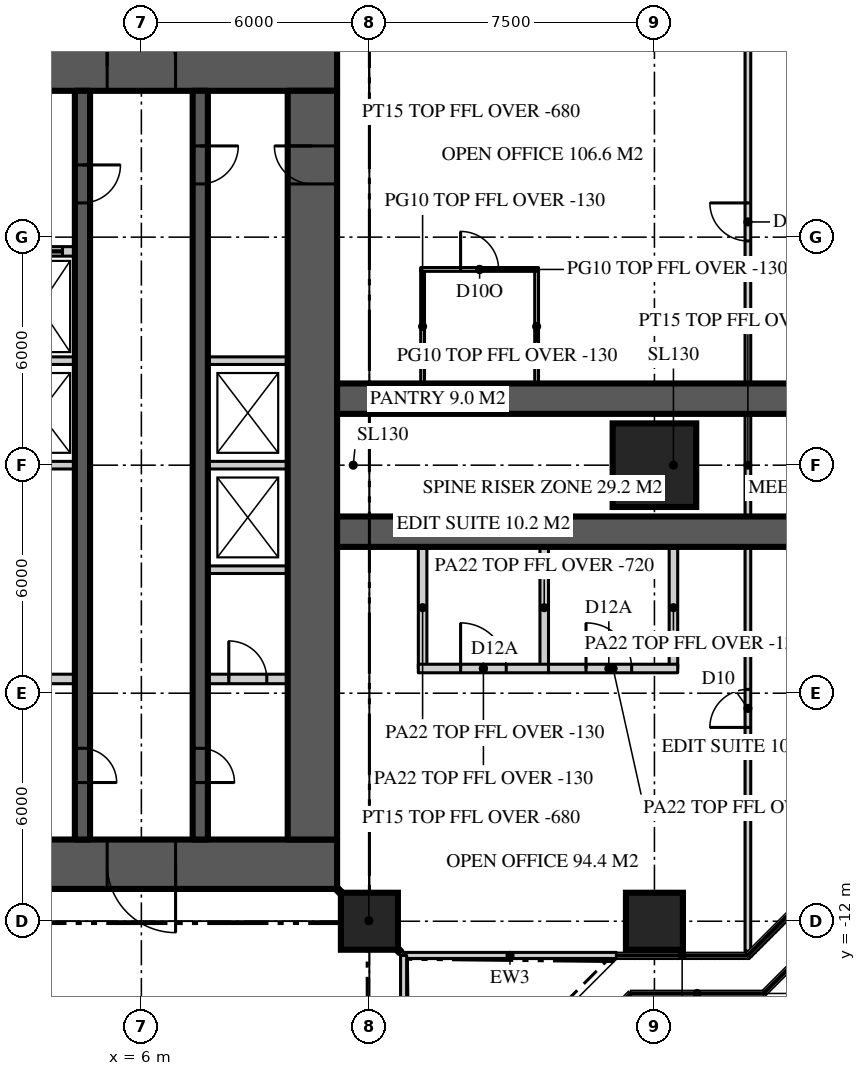
"""IFC4 building model, lengths in metres.
Left out: names, types, materials, properties, quantities, classifications, styles, units other than length and angle.
Written with IfcOpenShell. Run it as: python <this file> out.ifc"""

import sys

from ifc_helpers import new_model, si_unit, direction, frame, frame_2d, origin, origin_2d, place, context, subcontext, project, spatial, rectangle, extrude, element, fill, save


model = new_model("IFC4")
c1 = context("Model", 3, precision=1e-05, world=origin(), true_north=direction((0.0, 1.0)))
c2 = subcontext(c1, "Body", "Model", "MODEL_VIEW")
j1 = project(units=[si_unit("LENGTHUNIT", "METRE"), si_unit("PLANEANGLEUNIT", "RADIAN")], contexts=[c1])
p1 = place(None, origin())
s1 = spatial("IfcSite", under=j1, at=p1, CompositionType="ELEMENT")
p2 = place(p1, origin())
s2 = spatial("IfcBuilding", under=s1, at=p2, CompositionType="ELEMENT")
p3 = place(p2, frame((0.0, 0.0, 236.1)))
s3 = spatial("IfcBuildingStorey", under=s2, at=p3, CompositionType="ELEMENT", Elevation=236.1)
p4 = place(p3, frame((-11.15, 10.5, 0.0), z_axis=(0.0, 0.0, 1.0), x_axis=(1.0, 0.0, 0.0)))
e1 = element("IfcWall", 1, at=p4, inside=s3, PredefinedType="SHEAR", context=c2, shape_type="SweptSolid", body=[
    extrude(rectangle(XDim=22.3, YDim=1.3, at=frame_2d((11.15, 0.0))), origin(), (0.0, 0.0, 1.0), 3.9),
])
p5 = place(p4, frame((4.25, 0.0, 0.0)))
e2 = element("IfcOpeningElement", 2, at=p5, cuts=e1, PredefinedType="OPENING", context=c2, shape_type="SweptSolid", body=[
    extrude(rectangle(XDim=1.8, YDim=2.2, at=frame_2d((0.9, 1.1))), frame((0.0, 0.66, 0.0), z_axis=(0.0, -1.0, 0.0), x_axis=(1.0, 0.0, 0.0)), (0.0, 0.0, 1.0), 1.32),
])
p6 = place(p4, frame((16.25, 0.0, 0.0)))
e3 = element("IfcOpeningElement", 3, at=p6, cuts=e1, PredefinedType="OPENING", context=c2, shape_type="SweptSolid", body=[
    extrude(rectangle(XDim=1.8, YDim=2.2, at=frame_2d((0.9, 1.1))), frame((0.0, 0.66, 0.0), z_axis=(0.0, -1.0, 0.0), x_axis=(1.0, 0.0, 0.0)), (0.0, 0.0, 1.0), 1.32),
])
p7 = place(p3, frame((11.15, -10.5, 0.0), z_axis=(0.0, 0.0, 1.0), x_axis=(-1.0, 0.0, 0.0)))
e4 = element("IfcWall", 4, at=p7, inside=s3, PredefinedType="SHEAR", context=c2, shape_type="SweptSolid", body=[
    extrude(rectangle(XDim=22.3, YDim=1.3, at=frame_2d((11.15, 0.0))), origin(), (0.0, 0.0, 1.0), 3.9),
])
p8 = place(p7, frame((16.25, 0.0, 0.0)))
e5 = element("IfcOpeningElement", 5, at=p8, cuts=e4, PredefinedType="OPENING", context=c2, shape_type="SweptSolid", body=[
    extrude(rectangle(XDim=1.8, YDim=2.2, at=frame_2d((0.9, 1.1))), frame((0.0, 0.66, 0.0), z_axis=(0.0, -1.0, 0.0), x_axis=(1.0, 0.0, 0.0)), (0.0, 0.0, 1.0), 1.32),
])
p9 = place(p7, frame((4.25, 0.0, 0.0)))
e6 = element("IfcOpeningElement", 6, at=p9, cuts=e4, PredefinedType="OPENING", context=c2, shape_type="SweptSolid", body=[
    extrude(rectangle(XDim=1.8, YDim=2.2, at=frame_2d((0.9, 1.1))), frame((0.0, 0.66, 0.0), z_axis=(0.0, -1.0, 0.0), x_axis=(1.0, 0.0, 0.0)), (0.0, 0.0, 1.0), 1.32),
])
p10 = place(p3, frame((10.5, -9.85, 0.0), z_axis=(0.0, 0.0, 1.0), x_axis=(0.0, 1.0, 0.0)))
e7 = element("IfcWall", 7, at=p10, inside=s3, PredefinedType="SHEAR", context=c2, shape_type="SweptSolid", body=[
    extrude(rectangle(XDim=19.7, YDim=1.3, at=frame_2d((9.85, 0.0))), origin(), (0.0, 0.0, 1.0), 3.9),
])
p11 = place(p10, frame((17.25, 0.0, 0.0)))
e8 = element("IfcOpeningElement", 8, at=p11, cuts=e7, PredefinedType="OPENING", context=c2, shape_type="SweptSolid", body=[
    extrude(rectangle(XDim=1.0, YDim=2.2, at=frame_2d((0.5, 1.1))), frame((0.0, 0.66, 0.0), z_axis=(0.0, -1.0, 0.0), x_axis=(1.0, 0.0, 0.0)), (0.0, 0.0, 1.0), 1.32),
])
for number, where, z_axis, x_axis in (
    (9, (11.15, -1.75, 0.0), (0.0, 0.0, 1.0), (1.0, 0.0, 0.0)),
    (10, (11.15, 1.75, 0.0), (0.0, 0.0, 1.0), (1.0, 0.0, 0.0)),
):
    element("IfcWall", number, at=place(p3, frame(where, z_axis=z_axis, x_axis=x_axis)), inside=s3, PredefinedType="SHEAR", context=c2, shape_type="SweptSolid", body=[
        extrude(rectangle(XDim=15.25, YDim=0.8, at=frame_2d((7.625, 0.0))), origin(), (0.0, 0.0, 1.0), 3.9),
    ])
for number, where, z_axis, x_axis in (
    (11, (12.0, -12.0, 0.0), (0.0, 0.0, 1.0), (1.0, 0.0, 0.0)),
    (12, (19.5, -12.0, 0.0), (0.0, 0.0, 1.0), (1.0, 0.0, 0.0)),
):
    element("IfcColumn", number, at=place(p3, frame(where, z_axis=z_axis, x_axis=x_axis)), inside=s3, PredefinedType="COLUMN", context=c2, shape_type="SweptSolid", body=[
        extrude(rectangle(XDim=1.5, YDim=1.5, at=origin_2d()), origin(), (0.0, 0.0, 1.0), 3.9),
    ])
p12 = place(p3, frame((19.5, 0.0, 0.0), z_axis=(0.0, 0.0, 1.0), x_axis=(1.0, 0.0, 0.0)))
e13 = element("IfcColumn", 13, at=p12, inside=s3, PredefinedType="COLUMN", context=c2, shape_type="SweptSolid", body=[
    extrude(rectangle(XDim=2.2, YDim=2.2, at=origin_2d()), origin(), (0.0, 0.0, 1.0), 3.9),
])
p13 = place(p3, frame((12.9, -12.9, 0.0), z_axis=(0.0, 0.0, 1.0), x_axis=(1.0, 0.0, 0.0)))
e14 = element("IfcWall", 14, at=p13, inside=s3, PredefinedType="SOLIDWALL", context=c2, shape_type="SweptSolid", body=[
    extrude(rectangle(XDim=5.6, YDim=0.16, at=frame_2d((2.8, 0.0))), origin(), (0.0, 0.0, 1.0), 3.77),
])
p14 = place(p3, frame((12.9, -18.5, 0.0), z_axis=(0.0, 0.0, 1.0), x_axis=(0.0, 1.0, 0.0)))
e15 = element("IfcWall", 15, at=p14, inside=s3, PredefinedType="SOLIDWALL", context=c2, shape_type="SweptSolid", body=[
    extrude(rectangle(XDim=5.6, YDim=0.16, at=frame_2d((2.8, 0.0))), origin(), (0.0, 0.0, 1.0), 3.77),
])
p15 = place(p14, frame((2.3, 0.0, 0.0)))
e16 = element("IfcOpeningElement", 16, at=p15, cuts=e15, PredefinedType="OPENING", context=c2, shape_type="SweptSolid", body=[
    extrude(rectangle(XDim=1.0, YDim=2.2, at=frame_2d((0.5, 1.1))), frame((0.0, 0.09, 0.0), z_axis=(0.0, -1.0, 0.0), x_axis=(1.0, 0.0, 0.0)), (0.0, 0.0, 1.0), 0.18),
])
p16 = place(p3, frame((7.55, 9.85, 0.0), z_axis=(0.0, 0.0, 1.0), x_axis=(0.0, -1.0, 0.0)))
e17 = element("IfcWall", 17, at=p16, inside=s3, PredefinedType="SHEAR", context=c2, shape_type="SweptSolid", body=[
    extrude(rectangle(XDim=19.7, YDim=0.4, at=frame_2d((9.85, 0.0))), origin(), (0.0, 0.0, 1.0), 3.9),
])
p17 = place(p16, frame((1.45, 0.0, 0.0)))
e18 = element("IfcOpeningElement", 18, at=p17, cuts=e17, PredefinedType="OPENING", context=c2, shape_type="SweptSolid", body=[
    extrude(rectangle(XDim=1.0, YDim=2.2, at=frame_2d((0.5, 1.1))), frame((0.0, 0.21, 0.0), z_axis=(0.0, -1.0, 0.0), x_axis=(1.0, 0.0, 0.0)), (0.0, 0.0, 1.0), 0.42),
])
p18 = place(p16, frame((17.3, 0.0, 0.0)))
e19 = element("IfcOpeningElement", 19, at=p18, cuts=e17, PredefinedType="OPENING", context=c2, shape_type="SweptSolid", body=[
    extrude(rectangle(XDim=0.9, YDim=2.1, at=frame_2d((0.45, 1.05))), frame((0.0, 0.21, 0.0), z_axis=(0.0, -1.0, 0.0), x_axis=(1.0, 0.0, 0.0)), (0.0, 0.0, 1.0), 0.42),
])
p19 = place(p3, frame((4.45, 9.85, 0.0), z_axis=(0.0, 0.0, 1.0), x_axis=(0.0, -1.0, 0.0)))
e20 = element("IfcWall", 20, at=p19, inside=s3, PredefinedType="SHEAR", context=c2, shape_type="SweptSolid", body=[
    extrude(rectangle(XDim=19.7, YDim=0.4, at=frame_2d((9.85, 0.0))), origin(), (0.0, 0.0, 1.0), 3.9),
])
p20 = place(p19, frame((1.95, 0.0, 0.0)))
e21 = element("IfcOpeningElement", 21, at=p20, cuts=e20, PredefinedType="OPENING", context=c2, shape_type="SweptSolid", body=[
    extrude(rectangle(XDim=1.0, YDim=2.2, at=frame_2d((0.5, 1.1))), frame((0.0, 0.21, 0.0), z_axis=(0.0, -1.0, 0.0), x_axis=(1.0, 0.0, 0.0)), (0.0, 0.0, 1.0), 0.42),
])
p21 = place(p19, frame((17.3, 0.0, 0.0)))
e22 = element("IfcOpeningElement", 22, at=p21, cuts=e20, PredefinedType="OPENING", context=c2, shape_type="SweptSolid", body=[
    extrude(rectangle(XDim=0.9, YDim=2.1, at=frame_2d((0.45, 1.05))), frame((0.0, 0.21, 0.0), z_axis=(0.0, -1.0, 0.0), x_axis=(1.0, 0.0, 0.0)), (0.0, 0.0, 1.0), 0.42),
])
p22 = place(p3, frame((2.4, 5.625, 0.0), z_axis=(0.0, 0.0, 1.0), x_axis=(1.0, 0.0, 0.0)))
e23 = element("IfcWall", 23, at=p22, inside=s3, PredefinedType="SOLIDWALL", context=c2, shape_type="SweptSolid", body=[
    extrude(rectangle(XDim=1.85, YDim=0.25, at=frame_2d((0.925, 0.0))), origin(), (0.0, 0.0, 1.0), 3.7),
])
p23 = place(p22, frame((0.325, 0.0, 0.0)))
e24 = element("IfcOpeningElement", 24, at=p23, cuts=e23, PredefinedType="OPENING", context=c2, shape_type="SweptSolid", body=[
    extrude(rectangle(XDim=1.2, YDim=2.2, at=frame_2d((0.6, 1.1))), frame((0.0, 0.135, 0.0), z_axis=(0.0, -1.0, 0.0), x_axis=(1.0, 0.0, 0.0)), (0.0, 0.0, 1.0), 0.27),
])
p24 = place(p3, frame((2.4, -5.625, 0.0), z_axis=(0.0, 0.0, 1.0), x_axis=(1.0, 0.0, 0.0)))
e25 = element("IfcWall", 25, at=p24, inside=s3, PredefinedType="SOLIDWALL", context=c2, shape_type="SweptSolid", body=[
    extrude(rectangle(XDim=1.85, YDim=0.25, at=frame_2d((0.925, 0.0))), origin(), (0.0, 0.0, 1.0), 3.7),
])
p25 = place(p3, frame((7.75, -5.625, 0.0), z_axis=(0.0, 0.0, 1.0), x_axis=(1.0, 0.0, 0.0)))
e26 = element("IfcWall", 26, at=p25, inside=s3, PredefinedType="SOLIDWALL", context=c2, shape_type="SweptSolid", body=[
    extrude(rectangle(XDim=2.1, YDim=0.25, at=frame_2d((1.05, 0.0))), origin(), (0.0, 0.0, 1.0), 3.7),
])
p26 = place(p25, frame((0.55, 0.0, 0.0)))
e27 = element("IfcOpeningElement", 27, at=p26, cuts=e26, PredefinedType="OPENING", context=c2, shape_type="SweptSolid", body=[
    extrude(rectangle(XDim=1.0, YDim=2.2, at=frame_2d((0.5, 1.1))), frame((0.0, 0.135, 0.0), z_axis=(0.0, -1.0, 0.0), x_axis=(1.0, 0.0, 0.0)), (0.0, 0.0, 1.0), 0.27),
])
p27 = place(p3, frame((7.75, -2.75, 0.0), z_axis=(0.0, 0.0, 1.0), x_axis=(1.0, 0.0, 0.0)))
e28 = element("IfcWall", 28, at=p27, inside=s3, PredefinedType="SOLIDWALL", context=c2, shape_type="SweptSolid", body=[
    extrude(rectangle(XDim=2.1, YDim=0.2, at=frame_2d((1.05, 0.0))), origin(), (0.0, 0.0, 1.0), 3.7),
])
p28 = place(p3, frame((2.4, 0.0, 0.0), z_axis=(0.0, 0.0, 1.0), x_axis=(1.0, 0.0, 0.0)))
e29 = element("IfcWall", 29, at=p28, inside=s3, PredefinedType="SOLIDWALL", context=c2, shape_type="SweptSolid", body=[
    extrude(rectangle(XDim=1.85, YDim=0.2, at=frame_2d((0.925, 0.0))), origin(), (0.0, 0.0, 1.0), 3.7),
])
p29 = place(p3, frame((7.75, 0.0, 0.0), z_axis=(0.0, 0.0, 1.0), x_axis=(1.0, 0.0, 0.0)))
e30 = element("IfcWall", 30, at=p29, inside=s3, PredefinedType="SOLIDWALL", context=c2, shape_type="SweptSolid", body=[
    extrude(rectangle(XDim=2.1, YDim=0.2, at=frame_2d((1.05, 0.0))), origin(), (0.0, 0.0, 1.0), 3.7),
])
p30 = place(p3, frame((2.4, 2.75, 0.0), z_axis=(0.0, 0.0, 1.0), x_axis=(1.0, 0.0, 0.0)))
e31 = element("IfcWall", 31, at=p30, inside=s3, PredefinedType="SOLIDWALL", context=c2, shape_type="SweptSolid", body=[
    extrude(rectangle(XDim=1.85, YDim=0.2, at=frame_2d((0.925, 0.0))), origin(), (0.0, 0.0, 1.0), 3.7),
])
p31 = place(p3, frame((7.75, 2.75, 0.0), z_axis=(0.0, 0.0, 1.0), x_axis=(1.0, 0.0, 0.0)))
e32 = element("IfcWall", 32, at=p31, inside=s3, PredefinedType="SOLIDWALL", context=c2, shape_type="SweptSolid", body=[
    extrude(rectangle(XDim=2.1, YDim=0.2, at=frame_2d((1.05, 0.0))), origin(), (0.0, 0.0, 1.0), 3.7),
])
p32 = place(p3, frame((21.959, -12.786, 0.0), z_axis=(0.0, 0.0, 1.0), x_axis=(0.0, 1.0, 0.0)))
e33 = element("IfcWall", 33, at=p32, inside=s3, PredefinedType="PARTITIONING", context=c2, shape_type="SweptSolid", body=[
    extrude(rectangle(XDim=25.573, YDim=0.15, at=frame_2d((12.786, 0.0))), origin(), (0.0, 0.0, 1.0), 3.77),
])
p33 = place(p32, frame((18.687, 0.0, 0.0)))
e34 = element("IfcOpeningElement", 34, at=p33, cuts=e33, PredefinedType="OPENING", context=c2, shape_type="SweptSolid", body=[
    extrude(rectangle(XDim=1.0, YDim=2.2, at=frame_2d((0.5, 1.1))), frame((0.0, 0.085, 0.0), z_axis=(0.0, -1.0, 0.0), x_axis=(1.0, 0.0, 0.0)), (0.0, 0.0, 1.0), 0.17),
])
p34 = place(p32, frame((5.886, 0.0, 0.0)))
e35 = element("IfcOpeningElement", 35, at=p34, cuts=e33, PredefinedType="OPENING", context=c2, shape_type="SweptSolid", body=[
    extrude(rectangle(XDim=1.0, YDim=2.2, at=frame_2d((0.5, 1.1))), frame((0.0, 0.085, 0.0), z_axis=(0.0, -1.0, 0.0), x_axis=(1.0, 0.0, 0.0)), (0.0, 0.0, 1.0), 0.17),
])
for number, where, z_axis, x_axis in (
    (36, (13.4, 2.15, 0.0), (0.0, 0.0, 1.0), (0.0, 1.0, 0.0)),
    (37, (16.4, 2.15, 0.0), (0.0, 0.0, 1.0), (0.0, 1.0, 0.0)),
):
    element("IfcWall", number, at=place(p3, frame(where, z_axis=z_axis, x_axis=x_axis)), inside=s3, PredefinedType="PARTITIONING", context=c2, shape_type="SweptSolid", body=[
        extrude(rectangle(XDim=3.0, YDim=0.1, at=frame_2d((1.5, 0.0))), origin(), (0.0, 0.0, 1.0), 3.77),
    ])
p35 = place(p3, frame((13.35, 5.15, 0.0), z_axis=(0.0, 0.0, 1.0), x_axis=(1.0, 0.0, 0.0)))
e38 = element("IfcWall", 38, at=p35, inside=s3, PredefinedType="PARTITIONING", context=c2, shape_type="SweptSolid", body=[
    extrude(rectangle(XDim=3.1, YDim=0.1, at=frame_2d((1.55, 0.0))), origin(), (0.0, 0.0, 1.0), 3.77),
])
p36 = place(p35, frame((1.05, 0.0, 0.0)))
e39 = element("IfcOpeningElement", 39, at=p36, cuts=e38, PredefinedType="OPENING", context=c2, shape_type="SweptSolid", body=[
    extrude(rectangle(XDim=1.0, YDim=2.2, at=frame_2d((0.5, 1.1))), frame((0.0, 0.06, 0.0), z_axis=(0.0, -1.0, 0.0), x_axis=(1.0, 0.0, 0.0)), (0.0, 0.0, 1.0), 0.12),
])
p37 = place(p3, frame((13.4, -2.15, 0.0), z_axis=(0.0, 0.0, 1.0), x_axis=(0.0, -1.0, 0.0)))
e40 = element("IfcWall", 40, at=p37, inside=s3, PredefinedType="PARTITIONING", context=c2, shape_type="SweptSolid", body=[
    extrude(rectangle(XDim=3.2, YDim=0.225, at=frame_2d((1.6, 0.0))), origin(), (0.0, 0.0, 1.0), 3.77),
])
p38 = place(p3, frame((16.6, -2.15, 0.0), z_axis=(0.0, 0.0, 1.0), x_axis=(0.0, -1.0, 0.0)))
e41 = element("IfcWall", 41, at=p38, inside=s3, PredefinedType="PARTITIONING", context=c2, shape_type="SweptSolid", body=[
    extrude(rectangle(XDim=3.2, YDim=0.225, at=frame_2d((1.6, 0.0))), origin(), (0.0, 0.0, 1.0), 3.18),
])
p39 = place(p3, frame((13.288, -5.35, 0.0), z_axis=(0.0, 0.0, 1.0), x_axis=(1.0, 0.0, 0.0)))
e42 = element("IfcWall", 42, at=p39, inside=s3, PredefinedType="PARTITIONING", context=c2, shape_type="SweptSolid", body=[
    extrude(rectangle(XDim=3.425, YDim=0.225, at=frame_2d((1.712, 0.0))), origin(), (0.0, 0.0, 1.0), 3.77),
])
p40 = place(p39, frame((1.113, 0.0, 0.0)))
e43 = element("IfcOpeningElement", 43, at=p40, cuts=e42, PredefinedType="OPENING", context=c2, shape_type="SweptSolid", body=[
    extrude(rectangle(XDim=1.2, YDim=2.2, at=frame_2d((0.6, 1.1))), frame((0.0, 0.123, 0.0), z_axis=(0.0, -1.0, 0.0), x_axis=(1.0, 0.0, 0.0)), (0.0, 0.0, 1.0), 0.245),
])
p41 = place(p3, frame((20.0, -2.15, 0.0), z_axis=(0.0, 0.0, 1.0), x_axis=(0.0, -1.0, 0.0)))
e44 = element("IfcWall", 44, at=p41, inside=s3, PredefinedType="PARTITIONING", context=c2, shape_type="SweptSolid", body=[
    extrude(rectangle(XDim=3.2, YDim=0.225, at=frame_2d((1.6, 0.0))), origin(), (0.0, 0.0, 1.0), 3.77),
])
p42 = place(p3, frame((16.712, -5.35, 0.0), z_axis=(0.0, 0.0, 1.0), x_axis=(1.0, 0.0, 0.0)))
e45 = element("IfcWall", 45, at=p42, inside=s3, PredefinedType="PARTITIONING", context=c2, shape_type="SweptSolid", body=[
    extrude(rectangle(XDim=3.4, YDim=0.225, at=frame_2d((1.7, 0.0))), origin(), (0.0, 0.0, 1.0), 3.77),
])
p43 = place(p42, frame((0.988, 0.0, 0.0)))
e46 = element("IfcOpeningElement", 46, at=p43, cuts=e45, PredefinedType="OPENING", context=c2, shape_type="SweptSolid", body=[
    extrude(rectangle(XDim=1.2, YDim=2.2, at=frame_2d((0.6, 1.1))), frame((0.0, 0.123, 0.0), z_axis=(0.0, -1.0, 0.0), x_axis=(1.0, 0.0, 0.0)), (0.0, 0.0, 1.0), 0.245),
])
p44 = place(p3, frame((11.15, -11.15, 0.0), z_axis=(0.0, 0.0, 1.0), x_axis=(0.707106781187, -0.707106781187, 0.0)))
e47 = element("IfcWall", 47, at=p44, inside=s3, PredefinedType="PARTITIONING", context=c2, shape_type="SweptSolid", body=[
    extrude(rectangle(XDim=2.362, YDim=0.15, at=frame_2d((1.181, 0.0))), origin(), (0.0, 0.0, 1.0), 3.22),
])
p45 = place(p6, origin())
e48 = element("IfcDoor", 48, at=p45, inside=s3, OperationType="DOUBLE_DOOR_DOUBLE_SWING", PredefinedType="DOOR", context=c2, shape_type="SweptSolid", body=[
    extrude(rectangle(XDim=1.8, YDim=2.2, at=frame_2d((0.9, 1.1))), frame((0.0, 0.025, 0.0), z_axis=(0.0, -1.0, 0.0), x_axis=(1.0, 0.0, 0.0)), (0.0, 0.0, 1.0), 0.05),
])
fill(e3, e48)
p46 = place(p9, origin())
e49 = element("IfcDoor", 49, at=p46, inside=s3, OperationType="DOUBLE_DOOR_DOUBLE_SWING", PredefinedType="DOOR", context=c2, shape_type="SweptSolid", body=[
    extrude(rectangle(XDim=1.8, YDim=2.2, at=frame_2d((0.9, 1.1))), frame((0.0, 0.025, 0.0), z_axis=(0.0, -1.0, 0.0), x_axis=(1.0, 0.0, 0.0)), (0.0, 0.0, 1.0), 0.05),
])
fill(e6, e49)
p47 = place(p17, origin())
e50 = element("IfcDoor", 50, at=p47, inside=s3, OperationType="SINGLE_SWING_LEFT", PredefinedType="DOOR", context=c2, shape_type="SweptSolid", body=[
    extrude(rectangle(XDim=1.0, YDim=2.2, at=frame_2d((0.5, 1.1))), frame((0.0, 0.025, 0.0), z_axis=(0.0, -1.0, 0.0), x_axis=(1.0, 0.0, 0.0)), (0.0, 0.0, 1.0), 0.05),
])
fill(e18, e50)
p48 = place(p11, origin())
e51 = element("IfcDoor", 51, at=p48, inside=s3, OperationType="SINGLE_SWING_RIGHT", PredefinedType="DOOR", context=c2, shape_type="SweptSolid", body=[
    extrude(rectangle(XDim=1.0, YDim=2.2, at=frame_2d((0.5, 1.1))), frame((0.0, 0.025, 0.0), z_axis=(0.0, -1.0, 0.0), x_axis=(1.0, 0.0, 0.0)), (0.0, 0.0, 1.0), 0.05),
])
fill(e8, e51)
p49 = place(p20, origin())
e52 = element("IfcDoor", 52, at=p49, inside=s3, OperationType="SINGLE_SWING_LEFT", PredefinedType="DOOR", context=c2, shape_type="SweptSolid", body=[
    extrude(rectangle(XDim=1.0, YDim=2.2, at=frame_2d((0.5, 1.1))), frame((0.0, 0.025, 0.0), z_axis=(0.0, -1.0, 0.0), x_axis=(1.0, 0.0, 0.0)), (0.0, 0.0, 1.0), 0.05),
])
fill(e21, e52)
p50 = place(p18, origin())
e53 = element("IfcDoor", 53, at=p50, inside=s3, OperationType="SINGLE_SWING_RIGHT", PredefinedType="DOOR", context=c2, shape_type="SweptSolid", body=[
    extrude(rectangle(XDim=0.9, YDim=2.1, at=frame_2d((0.45, 1.05))), frame((0.0, 0.025, 0.0), z_axis=(0.0, -1.0, 0.0), x_axis=(1.0, 0.0, 0.0)), (0.0, 0.0, 1.0), 0.05),
])
fill(e19, e53)
p51 = place(p21, origin())
e54 = element("IfcDoor", 54, at=p51, inside=s3, OperationType="SINGLE_SWING_RIGHT", PredefinedType="DOOR", context=c2, shape_type="SweptSolid", body=[
    extrude(rectangle(XDim=0.9, YDim=2.1, at=frame_2d((0.45, 1.05))), frame((0.0, 0.025, 0.0), z_axis=(0.0, -1.0, 0.0), x_axis=(1.0, 0.0, 0.0)), (0.0, 0.0, 1.0), 0.05),
])
fill(e22, e54)
p52 = place(p23, origin())
e55 = element("IfcDoor", 55, at=p52, inside=s3, OperationType="SLIDING_TO_LEFT", PredefinedType="DOOR", context=c2, shape_type="SweptSolid", body=[
    extrude(rectangle(XDim=1.2, YDim=2.2, at=frame_2d((0.6, 1.1))), frame((0.0, 0.025, 0.0), z_axis=(0.0, -1.0, 0.0), x_axis=(1.0, 0.0, 0.0)), (0.0, 0.0, 1.0), 0.05),
])
fill(e24, e55)
p53 = place(p33, origin())
e56 = element("IfcDoor", 56, at=p53, inside=s3, OperationType="SINGLE_SWING_RIGHT", PredefinedType="DOOR", context=c2, shape_type="SweptSolid", body=[
    extrude(rectangle(XDim=1.0, YDim=2.2, at=frame_2d((0.5, 1.1))), frame((0.0, 0.025, 0.0), z_axis=(0.0, -1.0, 0.0), x_axis=(1.0, 0.0, 0.0)), (0.0, 0.0, 1.0), 0.05),
])
fill(e34, e56)
p54 = place(p34, origin())
e57 = element("IfcDoor", 57, at=p54, inside=s3, OperationType="SINGLE_SWING_LEFT", PredefinedType="DOOR", context=c2, shape_type="SweptSolid", body=[
    extrude(rectangle(XDim=1.0, YDim=2.2, at=frame_2d((0.5, 1.1))), frame((0.0, 0.025, 0.0), z_axis=(0.0, -1.0, 0.0), x_axis=(1.0, 0.0, 0.0)), (0.0, 0.0, 1.0), 0.05),
])
fill(e35, e57)
p55 = place(p36, origin())
e58 = element("IfcDoor", 58, at=p55, inside=s3, OperationType="SINGLE_SWING_LEFT", PredefinedType="DOOR", context=c2, shape_type="SweptSolid", body=[
    extrude(rectangle(XDim=1.0, YDim=2.2, at=frame_2d((0.5, 1.1))), frame((0.0, 0.025, 0.0), z_axis=(0.0, -1.0, 0.0), x_axis=(1.0, 0.0, 0.0)), (0.0, 0.0, 1.0), 0.05),
])
fill(e39, e58)
p56 = place(p40, origin())
e59 = element("IfcDoor", 59, at=p56, inside=s3, OperationType="SINGLE_SWING_LEFT", PredefinedType="DOOR", context=c2, shape_type="SweptSolid", body=[
    extrude(rectangle(XDim=1.2, YDim=2.2, at=frame_2d((0.6, 1.1))), frame((0.0, 0.025, 0.0), z_axis=(0.0, -1.0, 0.0), x_axis=(1.0, 0.0, 0.0)), (0.0, 0.0, 1.0), 0.05),
])
fill(e43, e59)
p57 = place(p43, origin())
e60 = element("IfcDoor", 60, at=p57, inside=s3, OperationType="SINGLE_SWING_LEFT", PredefinedType="DOOR", context=c2, shape_type="SweptSolid", body=[
    extrude(rectangle(XDim=1.2, YDim=2.2, at=frame_2d((0.6, 1.1))), frame((0.0, 0.025, 0.0), z_axis=(0.0, -1.0, 0.0), x_axis=(1.0, 0.0, 0.0)), (0.0, 0.0, 1.0), 0.05),
])
fill(e46, e60)
p58 = place(p26, origin())
e61 = element("IfcDoor", 61, at=p58, inside=s3, OperationType="SINGLE_SWING_LEFT", PredefinedType="DOOR", context=c2, shape_type="SweptSolid", body=[
    extrude(rectangle(XDim=1.0, YDim=2.2, at=frame_2d((0.5, 1.1))), frame((0.0, 0.025, 0.0), z_axis=(0.0, -1.0, 0.0), x_axis=(1.0, 0.0, 0.0)), (0.0, 0.0, 1.0), 0.05),
])
fill(e27, e61)
save(model, sys.argv[1])
